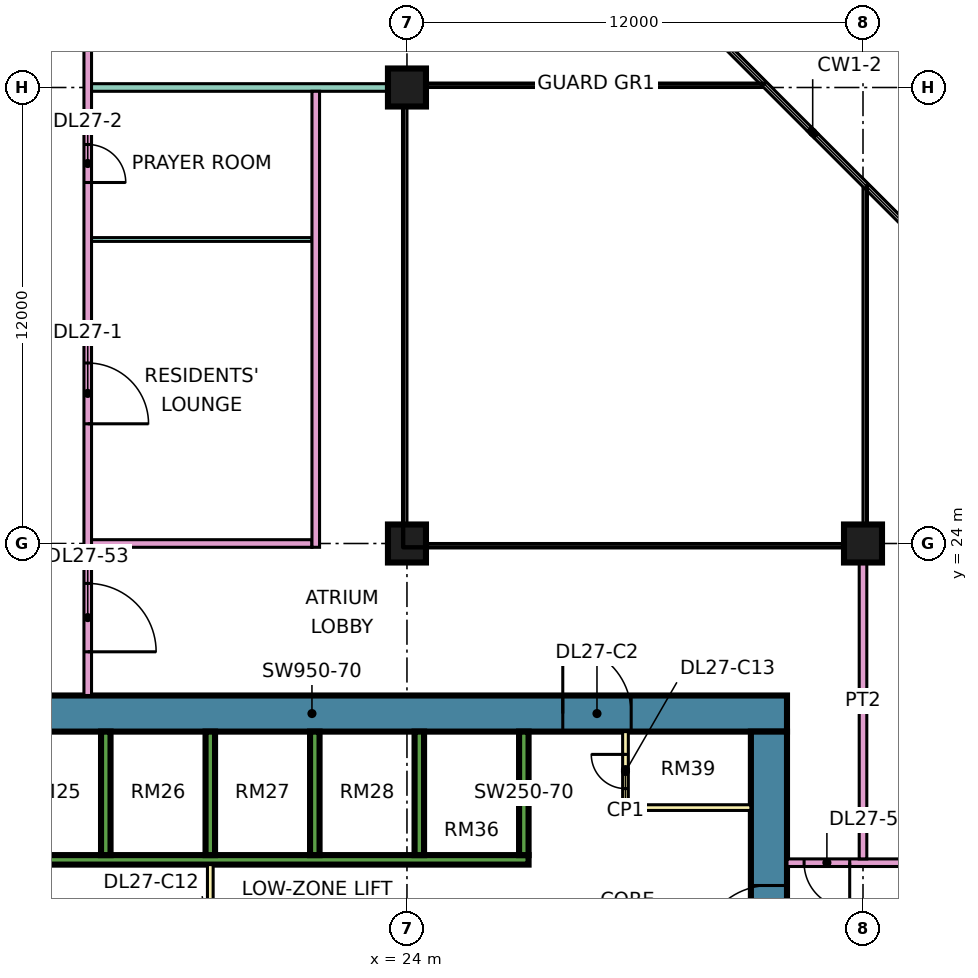
"""IFC4 building model, lengths in metres.
Left out: names, types, materials, properties, quantities, classifications, styles, units other than length and angle.
Written with IfcOpenShell. Run it as: python <this file> out.ifc"""

import sys

from ifc_helpers import new_model, si_unit, direction, frame, frame_2d, origin, origin_2d, place, context, subcontext, project, spatial, rectangle, extrude, element, fill, save


model = new_model("IFC4")
c1 = context("Model", 3, precision=1e-05, world=origin(), true_north=direction((0.0, 1.0)))
c2 = subcontext(c1, "Body", "Model", "MODEL_VIEW")
j1 = project(units=[si_unit("LENGTHUNIT", "METRE"), si_unit("PLANEANGLEUNIT", "RADIAN")], contexts=[c1])
p1 = place(None, origin())
s1 = spatial("IfcSite", under=j1, at=p1, CompositionType="ELEMENT")
p2 = place(p1, origin())
s2 = spatial("IfcBuilding", under=s1, at=p2, CompositionType="ELEMENT")
p3 = place(p2, frame((0.0, 0.0, 118.15)))
s3 = spatial("IfcBuildingStorey", under=s2, at=p3, CompositionType="ELEMENT", Elevation=118.15)
for number, where, z_axis, x_axis in (
    (1, (24.0, 24.0, 0.0), (0.0, 0.0, 1.0), (1.0, 0.0, 0.0)),
    (2, (24.0, 36.0, 0.0), (0.0, 0.0, 1.0), (1.0, 0.0, 0.0)),
    (3, (36.0, 24.0, 0.0), (0.0, 0.0, 1.0), (1.0, 0.0, 0.0)),
):
    element("IfcColumn", number, at=place(p3, frame(where, z_axis=z_axis, x_axis=x_axis)), inside=s3, PredefinedType="COLUMN", context=c2, shape_type="SweptSolid", body=[
        extrude(rectangle(XDim=1.0, YDim=1.0, at=origin_2d()), origin(), (0.0, 0.0, 1.0), 3.75),
    ])
p4 = place(p3, frame((9.0, 19.525, 0.0), z_axis=(0.0, 0.0, 1.0), x_axis=(1.0, 0.0, 0.0)))
e4 = element("IfcWall", 4, at=p4, inside=s3, PredefinedType="SHEAR", context=c2, shape_type="SweptSolid", body=[
    extrude(rectangle(XDim=25.0, YDim=0.95, at=frame_2d((12.5, 0.0))), origin(), (0.0, 0.0, 1.0), 3.75),
])
p5 = place(p4, frame((19.1, 0.0, 0.0)))
e5 = element("IfcOpeningElement", 5, at=p5, cuts=e4, PredefinedType="OPENING", context=c2, shape_type="SweptSolid", body=[
    extrude(rectangle(XDim=1.8, YDim=2.4, at=frame_2d((0.9, 1.2))), frame((0.0, 0.485, 0.0), z_axis=(0.0, -1.0, 0.0), x_axis=(1.0, 0.0, 0.0)), (0.0, 0.0, 1.0), 0.97),
])
p6 = place(p3, frame((33.525, 7.95, 0.0), z_axis=(0.0, 0.0, 1.0), x_axis=(0.0, 1.0, 0.0)))
e6 = element("IfcWall", 6, at=p6, inside=s3, PredefinedType="SHEAR", context=c2, shape_type="SweptSolid", body=[
    extrude(rectangle(XDim=11.1, YDim=0.95, at=frame_2d((5.55, 0.0))), origin(), (0.0, 0.0, 1.0), 3.75),
])
p7 = place(p6, frame((5.25, 0.0, 0.0)))
e7 = element("IfcOpeningElement", 7, at=p7, cuts=e6, PredefinedType="OPENING", context=c2, shape_type="SweptSolid", body=[
    extrude(rectangle(XDim=1.8, YDim=2.4, at=frame_2d((0.9, 1.2))), frame((0.0, 0.485, 0.0), z_axis=(0.0, -1.0, 0.0), x_axis=(1.0, 0.0, 0.0)), (0.0, 0.0, 1.0), 0.97),
])
p8 = place(p3, frame((13.45, 15.675, 0.0), z_axis=(0.0, 0.0, 1.0), x_axis=(1.0, 0.0, 0.0)))
e8 = element("IfcWall", 8, at=p8, inside=s3, PredefinedType="SHEAR", context=c2, shape_type="SweptSolid", body=[
    extrude(rectangle(XDim=13.75, YDim=0.25, at=frame_2d((6.875, 0.0))), origin(), (0.0, 0.0, 1.0), 3.75),
])
for number, where, z_axis, x_axis in (
    (9, (16.075, 15.8, 0.0), (0.0, 0.0, 1.0), (0.0, 1.0, 0.0)),
    (10, (18.825, 15.8, 0.0), (0.0, 0.0, 1.0), (0.0, 1.0, 0.0)),
    (11, (21.575, 15.8, 0.0), (0.0, 0.0, 1.0), (0.0, 1.0, 0.0)),
    (12, (24.325, 15.8, 0.0), (0.0, 0.0, 1.0), (0.0, 1.0, 0.0)),
    (13, (27.075, 15.8, 0.0), (0.0, 0.0, 1.0), (0.0, 1.0, 0.0)),
):
    element("IfcWall", number, at=place(p3, frame(where, z_axis=z_axis, x_axis=x_axis)), inside=s3, PredefinedType="SHEAR", context=c2, shape_type="SweptSolid", body=[
        extrude(rectangle(XDim=3.25, YDim=0.25, at=frame_2d((1.625, 0.0))), origin(), (0.0, 0.0, 1.0), 3.75),
    ])
p9 = place(p3, frame((18.825, 11.45, 0.0), z_axis=(0.0, 0.0, 1.0), x_axis=(0.0, 1.0, 0.0)))
e14 = element("IfcWall", 14, at=p9, inside=s3, PredefinedType="PARTITIONING", context=c2, shape_type="SweptSolid", body=[
    extrude(rectangle(XDim=4.1, YDim=0.15, at=frame_2d((2.05, 0.0))), origin(), (0.0, 0.0, 1.0), 3.35),
])
p10 = place(p9, frame((1.15, 0.0, 0.0)))
e15 = element("IfcOpeningElement", 15, at=p10, cuts=e14, PredefinedType="OPENING", context=c2, shape_type="SweptSolid", body=[
    extrude(rectangle(XDim=1.8, YDim=2.4, at=frame_2d((0.9, 1.2))), frame((0.0, 0.085, 0.0), z_axis=(0.0, -1.0, 0.0), x_axis=(1.0, 0.0, 0.0)), (0.0, 0.0, 1.0), 0.17),
])
p11 = place(p3, frame((29.75, 17.05, 0.0), z_axis=(0.0, 0.0, 1.0), x_axis=(0.0, 1.0, 0.0)))
e16 = element("IfcWall", 16, at=p11, inside=s3, PredefinedType="PARTITIONING", context=c2, shape_type="SweptSolid", body=[
    extrude(rectangle(XDim=2.0, YDim=0.15, at=frame_2d((1.0, 0.0))), origin(), (0.0, 0.0, 1.0), 3.35),
])
p12 = place(p11, frame((0.5, 0.0, 0.0)))
e17 = element("IfcOpeningElement", 17, at=p12, cuts=e16, PredefinedType="OPENING", context=c2, shape_type="SweptSolid", body=[
    extrude(rectangle(XDim=0.9, YDim=2.1, at=frame_2d((0.45, 1.05))), frame((0.0, 0.085, 0.0), z_axis=(0.0, -1.0, 0.0), x_axis=(1.0, 0.0, 0.0)), (0.0, 0.0, 1.0), 0.17),
])
p13 = place(p3, frame((29.75, 17.05, 0.0), z_axis=(0.0, 0.0, 1.0), x_axis=(1.0, 0.0, 0.0)))
e18 = element("IfcWall", 18, at=p13, inside=s3, PredefinedType="PARTITIONING", context=c2, shape_type="SweptSolid", body=[
    extrude(rectangle(XDim=3.3, YDim=0.15, at=frame_2d((1.65, 0.0))), origin(), (0.0, 0.0, 1.0), 3.35),
])
p14 = place(p3, frame((15.6, 20.0, 0.0), z_axis=(0.0, 0.0, 1.0), x_axis=(0.0, 1.0, 0.0)))
e19 = element("IfcWall", 19, at=p14, inside=s3, PredefinedType="PARTITIONING", context=c2, shape_type="SweptSolid", body=[
    extrude(rectangle(XDim=27.775, YDim=0.2, at=frame_2d((13.887, 0.0))), origin(), (0.0, 0.0, 1.0), 3.35),
])
p15 = place(p14, frame((7.15, 0.0, 0.0)))
e20 = element("IfcOpeningElement", 20, at=p15, cuts=e19, PredefinedType="OPENING", context=c2, shape_type="SweptSolid", body=[
    extrude(rectangle(XDim=1.6, YDim=2.1, at=frame_2d((0.8, 1.05))), frame((0.0, 0.11, 0.0), z_axis=(0.0, -1.0, 0.0), x_axis=(1.0, 0.0, 0.0)), (0.0, 0.0, 1.0), 0.22),
])
p16 = place(p14, frame((13.5, 0.0, 0.0)))
e21 = element("IfcOpeningElement", 21, at=p16, cuts=e19, PredefinedType="OPENING", context=c2, shape_type="SweptSolid", body=[
    extrude(rectangle(XDim=1.0, YDim=2.1, at=frame_2d((0.5, 1.05))), frame((0.0, 0.11, 0.0), z_axis=(0.0, -1.0, 0.0), x_axis=(1.0, 0.0, 0.0)), (0.0, 0.0, 1.0), 0.22),
])
p17 = place(p14, frame((17.2, 0.0, 0.0)))
e22 = element("IfcOpeningElement", 22, at=p17, cuts=e19, PredefinedType="OPENING", context=c2, shape_type="SweptSolid", body=[
    extrude(rectangle(XDim=1.0, YDim=2.1, at=frame_2d((0.5, 1.05))), frame((0.0, 0.11, 0.0), z_axis=(0.0, -1.0, 0.0), x_axis=(1.0, 0.0, 0.0)), (0.0, 0.0, 1.0), 0.22),
])
p18 = place(p14, frame((1.15, 0.0, 0.0)))
e23 = element("IfcOpeningElement", 23, at=p18, cuts=e19, PredefinedType="OPENING", context=c2, shape_type="SweptSolid", body=[
    extrude(rectangle(XDim=1.8, YDim=2.1, at=frame_2d((0.9, 1.05))), frame((0.0, 0.11, 0.0), z_axis=(0.0, -1.0, 0.0), x_axis=(1.0, 0.0, 0.0)), (0.0, 0.0, 1.0), 0.22),
])
p19 = place(p14, frame((25.9, 0.0, 0.0)))
e24 = element("IfcOpeningElement", 24, at=p19, cuts=e19, PredefinedType="OPENING", context=c2, shape_type="SweptSolid", body=[
    extrude(rectangle(XDim=1.0, YDim=2.1, at=frame_2d((0.5, 1.05))), frame((0.0, 0.11, 0.0), z_axis=(0.0, -1.0, 0.0), x_axis=(1.0, 0.0, 0.0)), (0.0, 0.0, 1.0), 0.22),
])
p20 = place(p3, frame((15.7, 24.0, 0.0), z_axis=(0.0, 0.0, 1.0), x_axis=(1.0, 0.0, 0.0)))
e25 = element("IfcWall", 25, at=p20, inside=s3, PredefinedType="PARTITIONING", context=c2, shape_type="SweptSolid", body=[
    extrude(rectangle(XDim=5.8, YDim=0.2, at=frame_2d((2.9, 0.0))), origin(), (0.0, 0.0, 1.0), 3.35),
])
p21 = place(p3, frame((15.7, 32.0, 0.0), z_axis=(0.0, 0.0, 1.0), x_axis=(1.0, 0.0, 0.0)))
e26 = element("IfcWall", 26, at=p21, inside=s3, PredefinedType="PARTITIONING", context=c2, shape_type="SweptSolid", body=[
    extrude(rectangle(XDim=5.8, YDim=0.1, at=frame_2d((2.9, 0.0))), origin(), (0.0, 0.0, 1.0), 3.35),
])
p22 = place(p3, frame((15.7, 36.0, 0.0), z_axis=(0.0, 0.0, 1.0), x_axis=(1.0, 0.0, 0.0)))
e27 = element("IfcWall", 27, at=p22, inside=s3, PredefinedType="PARTITIONING", context=c2, shape_type="SweptSolid", body=[
    extrude(rectangle(XDim=8.3, YDim=0.2, at=frame_2d((4.15, 0.0))), origin(), (0.0, 0.0, 1.0), 3.35),
])
p23 = place(p3, frame((21.6, 23.9, 0.0), z_axis=(0.0, 0.0, 1.0), x_axis=(0.0, 1.0, 0.0)))
e28 = element("IfcWall", 28, at=p23, inside=s3, PredefinedType="PARTITIONING", context=c2, shape_type="SweptSolid", body=[
    extrude(rectangle(XDim=12.0, YDim=0.2, at=frame_2d((6.0, 0.0))), origin(), (0.0, 0.0, 1.0), 3.35),
])
p24 = place(p3, frame((34.0, 15.6, 0.0), z_axis=(0.0, 0.0, 1.0), x_axis=(1.0, 0.0, 0.0)))
e29 = element("IfcWall", 29, at=p24, inside=s3, PredefinedType="PARTITIONING", context=c2, shape_type="SweptSolid", body=[
    extrude(rectangle(XDim=10.35, YDim=0.2, at=frame_2d((5.175, 0.0))), origin(), (0.0, 0.0, 1.0), 3.35),
])
p25 = place(p24, frame((5.6, 0.0, 0.0)))
e30 = element("IfcOpeningElement", 30, at=p25, cuts=e29, PredefinedType="OPENING", context=c2, shape_type="SweptSolid", body=[
    extrude(rectangle(XDim=1.0, YDim=2.1, at=frame_2d((0.5, 1.05))), frame((0.0, 0.11, 0.0), z_axis=(0.0, -1.0, 0.0), x_axis=(1.0, 0.0, 0.0)), (0.0, 0.0, 1.0), 0.22),
])
p26 = place(p24, frame((0.45, 0.0, 0.0)))
e31 = element("IfcOpeningElement", 31, at=p26, cuts=e29, PredefinedType="OPENING", context=c2, shape_type="SweptSolid", body=[
    extrude(rectangle(XDim=1.2, YDim=2.1, at=frame_2d((0.6, 1.05))), frame((0.0, 0.11, 0.0), z_axis=(0.0, -1.0, 0.0), x_axis=(1.0, 0.0, 0.0)), (0.0, 0.0, 1.0), 0.22),
])
p27 = place(p3, frame((36.0, 15.7, 0.0), z_axis=(0.0, 0.0, 1.0), x_axis=(0.0, 1.0, 0.0)))
e32 = element("IfcWall", 32, at=p27, inside=s3, PredefinedType="PARTITIONING", context=c2, shape_type="SweptSolid", body=[
    extrude(rectangle(XDim=8.3, YDim=0.2, at=frame_2d((4.15, 0.0))), origin(), (0.0, 0.0, 1.0), 3.35),
])
p28 = place(p7, origin())
e33 = element("IfcDoor", 33, at=p28, inside=s3, OperationType="DOUBLE_DOOR_SINGLE_SWING", PredefinedType="DOOR", context=c2, shape_type="SweptSolid", body=[
    extrude(rectangle(XDim=1.8, YDim=2.4, at=frame_2d((0.9, 1.2))), frame((0.0, 0.025, 0.0), z_axis=(0.0, -1.0, 0.0), x_axis=(1.0, 0.0, 0.0)), (0.0, 0.0, 1.0), 0.05),
])
fill(e7, e33)
p29 = place(p5, origin())
e34 = element("IfcDoor", 34, at=p29, inside=s3, OperationType="DOUBLE_DOOR_SINGLE_SWING", PredefinedType="DOOR", context=c2, shape_type="SweptSolid", body=[
    extrude(rectangle(XDim=1.8, YDim=2.4, at=frame_2d((0.9, 1.2))), frame((0.0, 0.025, 0.0), z_axis=(0.0, -1.0, 0.0), x_axis=(1.0, 0.0, 0.0)), (0.0, 0.0, 1.0), 0.05),
])
fill(e5, e34)
p30 = place(p12, frame((0.9, 0.0, 0.0), z_axis=(0.0, 0.0, 1.0), x_axis=(-1.0, 0.0, 0.0)))
e35 = element("IfcDoor", 35, at=p30, inside=s3, OperationType="SINGLE_SWING_RIGHT", PredefinedType="DOOR", context=c2, shape_type="SweptSolid", body=[
    extrude(rectangle(XDim=0.9, YDim=2.1, at=frame_2d((0.45, 1.05))), frame((0.0, 0.025, 0.0), z_axis=(0.0, -1.0, 0.0), x_axis=(1.0, 0.0, 0.0)), (0.0, 0.0, 1.0), 0.05),
])
fill(e17, e35)
p31 = place(p15, frame((1.6, 0.0, 0.0), z_axis=(0.0, 0.0, 1.0), x_axis=(-1.0, 0.0, 0.0)))
e36 = element("IfcDoor", 36, at=p31, inside=s3, OperationType="DOUBLE_DOOR_SINGLE_SWING", PredefinedType="DOOR", context=c2, shape_type="SweptSolid", body=[
    extrude(rectangle(XDim=1.6, YDim=2.1, at=frame_2d((0.8, 1.05))), frame((0.0, 0.025, 0.0), z_axis=(0.0, -1.0, 0.0), x_axis=(1.0, 0.0, 0.0)), (0.0, 0.0, 1.0), 0.05),
])
fill(e20, e36)
p32 = place(p16, frame((1.0, 0.0, 0.0), z_axis=(0.0, 0.0, 1.0), x_axis=(-1.0, 0.0, 0.0)))
e37 = element("IfcDoor", 37, at=p32, inside=s3, OperationType="SINGLE_SWING_LEFT", PredefinedType="DOOR", context=c2, shape_type="SweptSolid", body=[
    extrude(rectangle(XDim=1.0, YDim=2.1, at=frame_2d((0.5, 1.05))), frame((0.0, 0.025, 0.0), z_axis=(0.0, -1.0, 0.0), x_axis=(1.0, 0.0, 0.0)), (0.0, 0.0, 1.0), 0.05),
])
fill(e21, e37)
p33 = place(p26, origin())
e38 = element("IfcDoor", 38, at=p33, inside=s3, OperationType="SINGLE_SWING_RIGHT", PredefinedType="DOOR", context=c2, shape_type="SweptSolid", body=[
    extrude(rectangle(XDim=1.2, YDim=2.1, at=frame_2d((0.6, 1.05))), frame((0.0, 0.025, 0.0), z_axis=(0.0, -1.0, 0.0), x_axis=(1.0, 0.0, 0.0)), (0.0, 0.0, 1.0), 0.05),
])
fill(e31, e38)
p34 = place(p18, frame((1.8, 0.0, 0.0), z_axis=(0.0, 0.0, 1.0), x_axis=(-1.0, 0.0, 0.0)))
e39 = element("IfcDoor", 39, at=p34, inside=s3, OperationType="DOUBLE_DOOR_SINGLE_SWING", PredefinedType="DOOR", context=c2, shape_type="SweptSolid", body=[
    extrude(rectangle(XDim=1.8, YDim=2.1, at=frame_2d((0.9, 1.05))), frame((0.0, 0.025, 0.0), z_axis=(0.0, -1.0, 0.0), x_axis=(1.0, 0.0, 0.0)), (0.0, 0.0, 1.0), 0.05),
])
fill(e23, e39)
save(model, sys.argv[1])
